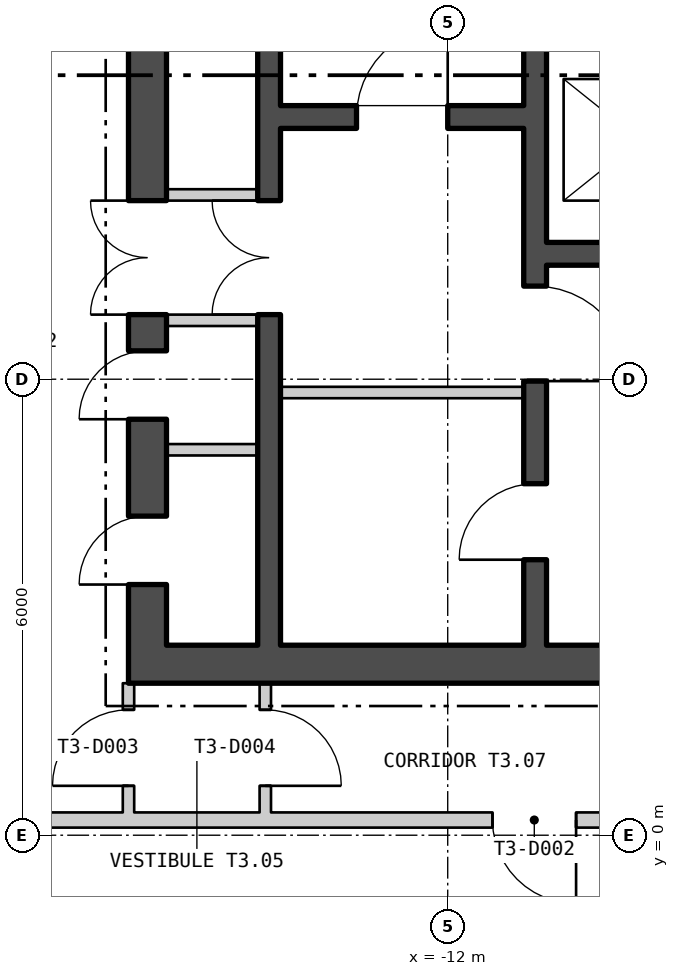
"""IFC4 building model, lengths in metres.
Left out: names, types, materials, properties, quantities, classifications, styles, units other than length and angle.
Written with IfcOpenShell. Run it as: python <this file> out.ifc"""

import sys

from ifc_helpers import new_model, si_unit, direction, frame, frame_2d, origin, place, context, subcontext, project, spatial, polyline, rectangle, outline, extrude, element, fill, save


model = new_model("IFC4")
c1 = context("Model", 3, precision=1e-05, world=origin(), true_north=direction((0.0, 1.0)))
c2 = subcontext(c1, "Body", "Model", "MODEL_VIEW")
j1 = project(units=[si_unit("LENGTHUNIT", "METRE"), si_unit("PLANEANGLEUNIT", "RADIAN")], contexts=[c1])
p1 = place(None, origin())
s1 = spatial("IfcSite", under=j1, at=p1, CompositionType="ELEMENT")
p2 = place(p1, origin())
s2 = spatial("IfcBuilding", under=s1, at=p2, CompositionType="ELEMENT")
p3 = place(p2, frame((0.0, 0.0, 186.6)))
s3 = spatial("IfcBuildingStorey", under=s2, at=p3, CompositionType="ELEMENT", Elevation=186.6)
p4 = place(p3, frame((-26.67, 13.393, -0.18), z_axis=(0.0, 0.0, 1.0), x_axis=(0.500000711659, -0.866024992908, 0.0)))
e1 = element("IfcWall", 1, at=p4, inside=s3, PredefinedType="SOLIDWALL", context=c2, shape_type="SweptSolid", body=[
    extrude(outline(polyline([(-0.13, -0.225), (45.87, -0.225), (45.61, 0.225), (0.13, 0.225), (-0.13, -0.225)])), origin(), (0.0, 0.0, 1.0), 6.0),
])
p5 = place(p4, frame((1.424, 0.0, 1.38)))
e2 = element("IfcOpeningElement", 2, at=p5, cuts=e1, PredefinedType="OPENING", context=c2, shape_type="SweptSolid", body=[
    extrude(rectangle(XDim=2.4, YDim=3.6, at=frame_2d((1.2, 1.8))), frame((0.0, 0.235, 0.0), z_axis=(0.0, -1.0, 0.0), x_axis=(1.0, 0.0, 0.0)), (0.0, 0.0, 1.0), 0.47),
])
p6 = place(p4, frame((5.893, 0.0, 1.38)))
e3 = element("IfcOpeningElement", 3, at=p6, cuts=e1, PredefinedType="OPENING", context=c2, shape_type="SweptSolid", body=[
    extrude(rectangle(XDim=2.4, YDim=3.6, at=frame_2d((1.2, 1.8))), frame((0.0, 0.235, 0.0), z_axis=(0.0, -1.0, 0.0), x_axis=(1.0, 0.0, 0.0)), (0.0, 0.0, 1.0), 0.47),
])
p7 = place(p4, frame((10.401, 0.0, 1.38)))
e4 = element("IfcOpeningElement", 4, at=p7, cuts=e1, PredefinedType="OPENING", context=c2, shape_type="SweptSolid", body=[
    extrude(rectangle(XDim=2.4, YDim=3.6, at=frame_2d((1.2, 1.8))), frame((0.0, 0.235, 0.0), z_axis=(0.0, -1.0, 0.0), x_axis=(1.0, 0.0, 0.0)), (0.0, 0.0, 1.0), 0.47),
])
p8 = place(p4, frame((14.909, 0.0, 1.38)))
e5 = element("IfcOpeningElement", 5, at=p8, cuts=e1, PredefinedType="OPENING", context=c2, shape_type="SweptSolid", body=[
    extrude(rectangle(XDim=2.4, YDim=3.6, at=frame_2d((1.2, 1.8))), frame((0.0, 0.235, 0.0), z_axis=(0.0, -1.0, 0.0), x_axis=(1.0, 0.0, 0.0)), (0.0, 0.0, 1.0), 0.47),
])
p9 = place(p4, frame((19.416, 0.0, 1.38)))
e6 = element("IfcOpeningElement", 6, at=p9, cuts=e1, PredefinedType="OPENING", context=c2, shape_type="SweptSolid", body=[
    extrude(rectangle(XDim=2.4, YDim=3.6, at=frame_2d((1.2, 1.8))), frame((0.0, 0.235, 0.0), z_axis=(0.0, -1.0, 0.0), x_axis=(1.0, 0.0, 0.0)), (0.0, 0.0, 1.0), 0.47),
])
p10 = place(p4, frame((23.924, 0.0, 1.38)))
e7 = element("IfcOpeningElement", 7, at=p10, cuts=e1, PredefinedType="OPENING", context=c2, shape_type="SweptSolid", body=[
    extrude(rectangle(XDim=2.4, YDim=3.6, at=frame_2d((1.2, 1.8))), frame((0.0, 0.235, 0.0), z_axis=(0.0, -1.0, 0.0), x_axis=(1.0, 0.0, 0.0)), (0.0, 0.0, 1.0), 0.47),
])
p11 = place(p4, frame((28.431, 0.0, 1.38)))
e8 = element("IfcOpeningElement", 8, at=p11, cuts=e1, PredefinedType="OPENING", context=c2, shape_type="SweptSolid", body=[
    extrude(rectangle(XDim=2.4, YDim=3.6, at=frame_2d((1.2, 1.8))), frame((0.0, 0.235, 0.0), z_axis=(0.0, -1.0, 0.0), x_axis=(1.0, 0.0, 0.0)), (0.0, 0.0, 1.0), 0.47),
])
p12 = place(p4, frame((32.939, 0.0, 1.38)))
e9 = element("IfcOpeningElement", 9, at=p12, cuts=e1, PredefinedType="OPENING", context=c2, shape_type="SweptSolid", body=[
    extrude(rectangle(XDim=2.4, YDim=3.6, at=frame_2d((1.2, 1.8))), frame((0.0, 0.235, 0.0), z_axis=(0.0, -1.0, 0.0), x_axis=(1.0, 0.0, 0.0)), (0.0, 0.0, 1.0), 0.47),
])
p13 = place(p4, frame((37.447, 0.0, 1.38)))
e10 = element("IfcOpeningElement", 10, at=p13, cuts=e1, PredefinedType="OPENING", context=c2, shape_type="SweptSolid", body=[
    extrude(rectangle(XDim=2.4, YDim=3.6, at=frame_2d((1.2, 1.8))), frame((0.0, 0.235, 0.0), z_axis=(0.0, -1.0, 0.0), x_axis=(1.0, 0.0, 0.0)), (0.0, 0.0, 1.0), 0.47),
])
p14 = place(p4, frame((41.916, 0.0, 1.38)))
e11 = element("IfcOpeningElement", 11, at=p14, cuts=e1, PredefinedType="OPENING", context=c2, shape_type="SweptSolid", body=[
    extrude(rectangle(XDim=2.4, YDim=3.6, at=frame_2d((1.2, 1.8))), frame((0.0, 0.235, 0.0), z_axis=(0.0, -1.0, 0.0), x_axis=(1.0, 0.0, 0.0)), (0.0, 0.0, 1.0), 0.47),
])
p15 = place(p3, frame((-16.2, 2.25, 0.0), z_axis=(0.0, 0.0, 1.0), x_axis=(1.0, 0.0, 0.0)))
e12 = element("IfcWall", 12, at=p15, inside=s3, PredefinedType="SHEAR", context=c2, shape_type="SweptSolid", body=[
    extrude(rectangle(XDim=32.4, YDim=0.5, at=frame_2d((16.2, 0.0))), origin(), (0.0, 0.0, 1.0), 5.8),
])
p16 = place(p15, frame((10.7, 0.0, 0.0)))
e13 = element("IfcOpeningElement", 13, at=p16, cuts=e12, PredefinedType="OPENING", context=c2, shape_type="SweptSolid", body=[
    extrude(rectangle(XDim=1.8, YDim=2.4, at=frame_2d((0.9, 1.2))), frame((0.0, 0.26, 0.0), z_axis=(0.0, -1.0, 0.0), x_axis=(1.0, 0.0, 0.0)), (0.0, 0.0, 1.0), 0.52),
])
p17 = place(p15, frame((20.7, 0.0, 0.0)))
e14 = element("IfcOpeningElement", 14, at=p17, cuts=e12, PredefinedType="OPENING", context=c2, shape_type="SweptSolid", body=[
    extrude(rectangle(XDim=1.8, YDim=2.4, at=frame_2d((0.9, 1.2))), frame((0.0, 0.26, 0.0), z_axis=(0.0, -1.0, 0.0), x_axis=(1.0, 0.0, 0.0)), (0.0, 0.0, 1.0), 0.52),
])
p18 = place(p3, frame((-15.95, 2.5, 0.0), z_axis=(0.0, 0.0, 1.0), x_axis=(0.0, 1.0, 0.0)))
e15 = element("IfcWall", 15, at=p18, inside=s3, PredefinedType="SHEAR", context=c2, shape_type="SweptSolid", body=[
    extrude(rectangle(XDim=15.0, YDim=0.5, at=frame_2d((7.5, 0.0))), origin(), (0.0, 0.0, 1.0), 5.8),
])
p19 = place(p18, frame((4.35, 0.0, 0.0)))
e16 = element("IfcOpeningElement", 16, at=p19, cuts=e15, PredefinedType="OPENING", context=c2, shape_type="SweptSolid", body=[
    extrude(rectangle(XDim=1.5, YDim=2.1, at=frame_2d((0.75, 1.05))), frame((0.0, 0.26, 0.0), z_axis=(0.0, -1.0, 0.0), x_axis=(1.0, 0.0, 0.0)), (0.0, 0.0, 1.0), 0.52),
])
p20 = place(p18, frame((0.798, 0.0, 0.0)))
e17 = element("IfcOpeningElement", 17, at=p20, cuts=e15, PredefinedType="OPENING", context=c2, shape_type="SweptSolid", body=[
    extrude(rectangle(XDim=0.9, YDim=2.1, at=frame_2d((0.45, 1.05))), frame((0.0, 0.26, 0.0), z_axis=(0.0, -1.0, 0.0), x_axis=(1.0, 0.0, 0.0)), (0.0, 0.0, 1.0), 0.52),
])
p21 = place(p18, frame((2.973, 0.0, 0.0)))
e18 = element("IfcOpeningElement", 18, at=p21, cuts=e15, PredefinedType="OPENING", context=c2, shape_type="SweptSolid", body=[
    extrude(rectangle(XDim=0.9, YDim=2.1, at=frame_2d((0.45, 1.05))), frame((0.0, 0.26, 0.0), z_axis=(0.0, -1.0, 0.0), x_axis=(1.0, 0.0, 0.0)), (0.0, 0.0, 1.0), 0.52),
])
p22 = place(p18, frame((8.865, 0.0, 0.0)))
e19 = element("IfcOpeningElement", 19, at=p22, cuts=e15, PredefinedType="OPENING", context=c2, shape_type="SweptSolid", body=[
    extrude(rectangle(XDim=0.9, YDim=2.1, at=frame_2d((0.45, 1.05))), frame((0.0, 0.26, 0.0), z_axis=(0.0, -1.0, 0.0), x_axis=(1.0, 0.0, 0.0)), (0.0, 0.0, 1.0), 0.52),
])
p23 = place(p18, frame((13.39, 0.0, 0.0)))
e20 = element("IfcOpeningElement", 20, at=p23, cuts=e15, PredefinedType="OPENING", context=c2, shape_type="SweptSolid", body=[
    extrude(rectangle(XDim=1.0, YDim=2.1, at=frame_2d((0.5, 1.05))), frame((0.0, 0.26, 0.0), z_axis=(0.0, -1.0, 0.0), x_axis=(1.0, 0.0, 0.0)), (0.0, 0.0, 1.0), 0.52),
])
p24 = place(p3, frame((-10.85, 2.5, 0.0), z_axis=(0.0, 0.0, 1.0), x_axis=(0.0, 1.0, 0.0)))
e21 = element("IfcWall", 21, at=p24, inside=s3, PredefinedType="SHEAR", context=c2, shape_type="SweptSolid", body=[
    extrude(rectangle(XDim=15.0, YDim=0.3, at=frame_2d((7.5, 0.0))), origin(), (0.0, 0.0, 1.0), 5.8),
])
p25 = place(p24, frame((3.475, 0.0, 0.0)))
e22 = element("IfcOpeningElement", 22, at=p25, cuts=e21, PredefinedType="OPENING", context=c2, shape_type="SweptSolid", body=[
    extrude(rectangle(XDim=1.25, YDim=2.1, at=frame_2d((0.625, 1.05))), frame((0.0, 0.16, 0.0), z_axis=(0.0, -1.0, 0.0), x_axis=(1.0, 0.0, 0.0)), (0.0, 0.0, 1.0), 0.32),
])
p26 = place(p24, frame((1.125, 0.0, 0.0)))
e23 = element("IfcOpeningElement", 23, at=p26, cuts=e21, PredefinedType="OPENING", context=c2, shape_type="SweptSolid", body=[
    extrude(rectangle(XDim=1.0, YDim=2.1, at=frame_2d((0.5, 1.05))), frame((0.0, 0.16, 0.0), z_axis=(0.0, -1.0, 0.0), x_axis=(1.0, 0.0, 0.0)), (0.0, 0.0, 1.0), 0.32),
])
p27 = place(p3, frame((-14.35, 2.5, 0.0), z_axis=(0.0, 0.0, 1.0), x_axis=(0.0, 1.0, 0.0)))
e24 = element("IfcWall", 24, at=p27, inside=s3, PredefinedType="SHEAR", context=c2, shape_type="SweptSolid", body=[
    extrude(rectangle(XDim=15.0, YDim=0.3, at=frame_2d((7.5, 0.0))), origin(), (0.0, 0.0, 1.0), 5.8),
])
p28 = place(p27, frame((4.35, 0.0, 0.0)))
e25 = element("IfcOpeningElement", 25, at=p28, cuts=e24, PredefinedType="OPENING", context=c2, shape_type="SweptSolid", body=[
    extrude(rectangle(XDim=1.5, YDim=2.1, at=frame_2d((0.75, 1.05))), frame((0.0, 0.16, 0.0), z_axis=(0.0, -1.0, 0.0), x_axis=(1.0, 0.0, 0.0)), (0.0, 0.0, 1.0), 0.32),
])
p29 = place(p3, frame((-14.2, 9.45, 0.0), z_axis=(0.0, 0.0, 1.0), x_axis=(1.0, 0.0, 0.0)))
e26 = element("IfcWall", 26, at=p29, inside=s3, PredefinedType="SHEAR", context=c2, shape_type="SweptSolid", body=[
    extrude(rectangle(XDim=3.2, YDim=0.3, at=frame_2d((1.6, 0.0))), origin(), (0.0, 0.0, 1.0), 5.8),
])
p30 = place(p29, frame((1.0, 0.0, 0.0)))
e27 = element("IfcOpeningElement", 27, at=p30, cuts=e26, PredefinedType="OPENING", context=c2, shape_type="SweptSolid", body=[
    extrude(rectangle(XDim=1.2, YDim=2.1, at=frame_2d((0.6, 1.05))), frame((0.0, 0.16, 0.0), z_axis=(0.0, -1.0, 0.0), x_axis=(1.0, 0.0, 0.0)), (0.0, 0.0, 1.0), 0.32),
])
p31 = place(p3, frame((-10.7, 7.65, 0.0), z_axis=(0.0, 0.0, 1.0), x_axis=(1.0, 0.0, 0.0)))
e28 = element("IfcWall", 28, at=p31, inside=s3, PredefinedType="SHEAR", context=c2, shape_type="SweptSolid", body=[
    extrude(rectangle(XDim=10.3, YDim=0.3, at=frame_2d((5.15, 0.0))), origin(), (0.0, 0.0, 1.0), 5.8),
])
p32 = place(p3, frame((-14.2, 5.825, 0.0), z_axis=(0.0, 0.0, 1.0), x_axis=(1.0, 0.0, 0.0)))
e29 = element("IfcWall", 29, at=p32, inside=s3, PredefinedType="PARTITIONING", context=c2, shape_type="SweptSolid", body=[
    extrude(rectangle(XDim=3.2, YDim=0.15, at=frame_2d((1.6, 0.0))), origin(), (0.0, 0.0, 1.0), 5.8),
])
for number, where, z_axis, x_axis in (
    (30, (-15.7, 6.775, 0.0), (0.0, 0.0, 1.0), (1.0, 0.0, 0.0)),
    (31, (-15.7, 8.425, 0.0), (0.0, 0.0, 1.0), (1.0, 0.0, 0.0)),
    (32, (-15.7, 5.072, 0.0), (0.0, 0.0, 1.0), (1.0, 0.0, 0.0)),
):
    element("IfcWall", number, at=place(p3, frame(where, z_axis=z_axis, x_axis=x_axis)), inside=s3, PredefinedType="PARTITIONING", context=c2, shape_type="SweptSolid", body=[
        extrude(rectangle(XDim=1.2, YDim=0.15, at=frame_2d((0.6, 0.0))), origin(), (0.0, 0.0, 1.0), 5.8),
    ])
p33 = place(p3, frame((-17.9, 0.2, 0.0), z_axis=(0.0, 0.0, 1.0), x_axis=(1.0, 0.0, 0.0)))
e33 = element("IfcWall", 33, at=p33, inside=s3, PredefinedType="PARTITIONING", context=c2, shape_type="SweptSolid", body=[
    extrude(rectangle(XDim=10.84, YDim=0.2, at=frame_2d((5.42, 0.0))), origin(), (0.0, 0.0, 1.0), 5.8),
])
p34 = place(p33, frame((6.489, 0.0, 0.0)))
e34 = element("IfcOpeningElement", 34, at=p34, cuts=e33, PredefinedType="OPENING", context=c2, shape_type="SweptSolid", body=[
    extrude(rectangle(XDim=1.1, YDim=2.1, at=frame_2d((0.55, 1.05))), frame((0.0, 0.11, 0.0), z_axis=(0.0, -1.0, 0.0), x_axis=(1.0, 0.0, 0.0)), (0.0, 0.0, 1.0), 0.22),
])
p35 = place(p3, frame((-16.2, 0.3, 0.0), z_axis=(0.0, 0.0, 1.0), x_axis=(0.0, 1.0, 0.0)))
e35 = element("IfcWall", 35, at=p35, inside=s3, PredefinedType="PARTITIONING", context=c2, shape_type="SweptSolid", body=[
    extrude(rectangle(XDim=1.7, YDim=0.15, at=frame_2d((0.85, 0.0))), origin(), (0.0, 0.0, 1.0), 5.8),
])
p36 = place(p35, frame((0.35, 0.0, 0.0)))
e36 = element("IfcOpeningElement", 36, at=p36, cuts=e35, PredefinedType="OPENING", context=c2, shape_type="SweptSolid", body=[
    extrude(rectangle(XDim=1.0, YDim=2.1, at=frame_2d((0.5, 1.05))), frame((0.0, 0.085, 0.0), z_axis=(0.0, -1.0, 0.0), x_axis=(1.0, 0.0, 0.0)), (0.0, 0.0, 1.0), 0.17),
])
p37 = place(p3, frame((-14.4, 0.3, 0.0), z_axis=(0.0, 0.0, 1.0), x_axis=(0.0, 1.0, 0.0)))
e37 = element("IfcWall", 37, at=p37, inside=s3, PredefinedType="PARTITIONING", context=c2, shape_type="SweptSolid", body=[
    extrude(rectangle(XDim=1.7, YDim=0.15, at=frame_2d((0.85, 0.0))), origin(), (0.0, 0.0, 1.0), 5.8),
])
p38 = place(p37, frame((0.35, 0.0, 0.0)))
e38 = element("IfcOpeningElement", 38, at=p38, cuts=e37, PredefinedType="OPENING", context=c2, shape_type="SweptSolid", body=[
    extrude(rectangle(XDim=1.0, YDim=2.1, at=frame_2d((0.5, 1.05))), frame((0.0, 0.085, 0.0), z_axis=(0.0, -1.0, 0.0), x_axis=(1.0, 0.0, 0.0)), (0.0, 0.0, 1.0), 0.17),
])
p39 = place(p30, origin())
e39 = element("IfcDoor", 39, at=p39, inside=s3, OperationType="SINGLE_SWING_LEFT", PredefinedType="DOOR", context=c2, shape_type="SweptSolid", body=[
    extrude(rectangle(XDim=1.2, YDim=2.1, at=frame_2d((0.6, 1.05))), frame((0.0, 0.025, 0.0), z_axis=(0.0, -1.0, 0.0), x_axis=(1.0, 0.0, 0.0)), (0.0, 0.0, 1.0), 0.05),
])
fill(e27, e39)
p40 = place(p25, origin())
e40 = element("IfcDoor", 40, at=p40, inside=s3, OperationType="SINGLE_SWING_LEFT", PredefinedType="DOOR", context=c2, shape_type="SweptSolid", body=[
    extrude(rectangle(XDim=1.25, YDim=2.1, at=frame_2d((0.625, 1.05))), frame((0.0, 0.025, 0.0), z_axis=(0.0, -1.0, 0.0), x_axis=(1.0, 0.0, 0.0)), (0.0, 0.0, 1.0), 0.05),
])
fill(e22, e40)
p41 = place(p26, origin())
e41 = element("IfcDoor", 41, at=p41, inside=s3, OperationType="SINGLE_SWING_RIGHT", PredefinedType="DOOR", context=c2, shape_type="SweptSolid", body=[
    extrude(rectangle(XDim=1.0, YDim=2.1, at=frame_2d((0.5, 1.05))), frame((0.0, 0.025, 0.0), z_axis=(0.0, -1.0, 0.0), x_axis=(1.0, 0.0, 0.0)), (0.0, 0.0, 1.0), 0.05),
])
fill(e23, e41)
p42 = place(p28, origin())
e42 = element("IfcDoor", 42, at=p42, inside=s3, OperationType="DOUBLE_DOOR_SINGLE_SWING", PredefinedType="DOOR", context=c2, shape_type="SweptSolid", body=[
    extrude(rectangle(XDim=1.5, YDim=2.1, at=frame_2d((0.75, 1.05))), frame((0.0, 0.025, 0.0), z_axis=(0.0, -1.0, 0.0), x_axis=(1.0, 0.0, 0.0)), (0.0, 0.0, 1.0), 0.05),
])
fill(e25, e42)
p43 = place(p19, origin())
e43 = element("IfcDoor", 43, at=p43, inside=s3, OperationType="DOUBLE_DOOR_SINGLE_SWING", PredefinedType="DOOR", context=c2, shape_type="SweptSolid", body=[
    extrude(rectangle(XDim=1.5, YDim=2.1, at=frame_2d((0.75, 1.05))), frame((0.0, 0.025, 0.0), z_axis=(0.0, -1.0, 0.0), x_axis=(1.0, 0.0, 0.0)), (0.0, 0.0, 1.0), 0.05),
])
fill(e16, e43)
p44 = place(p20, origin())
e44 = element("IfcDoor", 44, at=p44, inside=s3, OperationType="SINGLE_SWING_RIGHT", PredefinedType="DOOR", context=c2, shape_type="SweptSolid", body=[
    extrude(rectangle(XDim=0.9, YDim=2.1, at=frame_2d((0.45, 1.05))), frame((0.0, 0.025, 0.0), z_axis=(0.0, -1.0, 0.0), x_axis=(1.0, 0.0, 0.0)), (0.0, 0.0, 1.0), 0.05),
])
fill(e17, e44)
p45 = place(p21, origin())
e45 = element("IfcDoor", 45, at=p45, inside=s3, OperationType="SINGLE_SWING_RIGHT", PredefinedType="DOOR", context=c2, shape_type="SweptSolid", body=[
    extrude(rectangle(XDim=0.9, YDim=2.1, at=frame_2d((0.45, 1.05))), frame((0.0, 0.025, 0.0), z_axis=(0.0, -1.0, 0.0), x_axis=(1.0, 0.0, 0.0)), (0.0, 0.0, 1.0), 0.05),
])
fill(e18, e45)
p46 = place(p34, origin())
e46 = element("IfcDoor", 46, at=p46, inside=s3, OperationType="SINGLE_SWING_RIGHT", PredefinedType="DOOR", context=c2, shape_type="SweptSolid", body=[
    extrude(rectangle(XDim=1.1, YDim=2.1, at=frame_2d((0.55, 1.05))), frame((0.0, 0.025, 0.0), z_axis=(0.0, -1.0, 0.0), x_axis=(1.0, 0.0, 0.0)), (0.0, 0.0, 1.0), 0.05),
])
fill(e34, e46)
p47 = place(p36, origin())
e47 = element("IfcDoor", 47, at=p47, inside=s3, OperationType="SINGLE_SWING_RIGHT", PredefinedType="DOOR", context=c2, shape_type="SweptSolid", body=[
    extrude(rectangle(XDim=1.0, YDim=2.1, at=frame_2d((0.5, 1.05))), frame((0.0, 0.025, 0.0), z_axis=(0.0, -1.0, 0.0), x_axis=(1.0, 0.0, 0.0)), (0.0, 0.0, 1.0), 0.05),
])
fill(e36, e47)
p48 = place(p38, origin())
e48 = element("IfcDoor", 48, at=p48, inside=s3, OperationType="SINGLE_SWING_LEFT", PredefinedType="DOOR", context=c2, shape_type="SweptSolid", body=[
    extrude(rectangle(XDim=1.0, YDim=2.1, at=frame_2d((0.5, 1.05))), frame((0.0, 0.025, 0.0), z_axis=(0.0, -1.0, 0.0), x_axis=(1.0, 0.0, 0.0)), (0.0, 0.0, 1.0), 0.05),
])
fill(e38, e48)
save(model, sys.argv[1])
